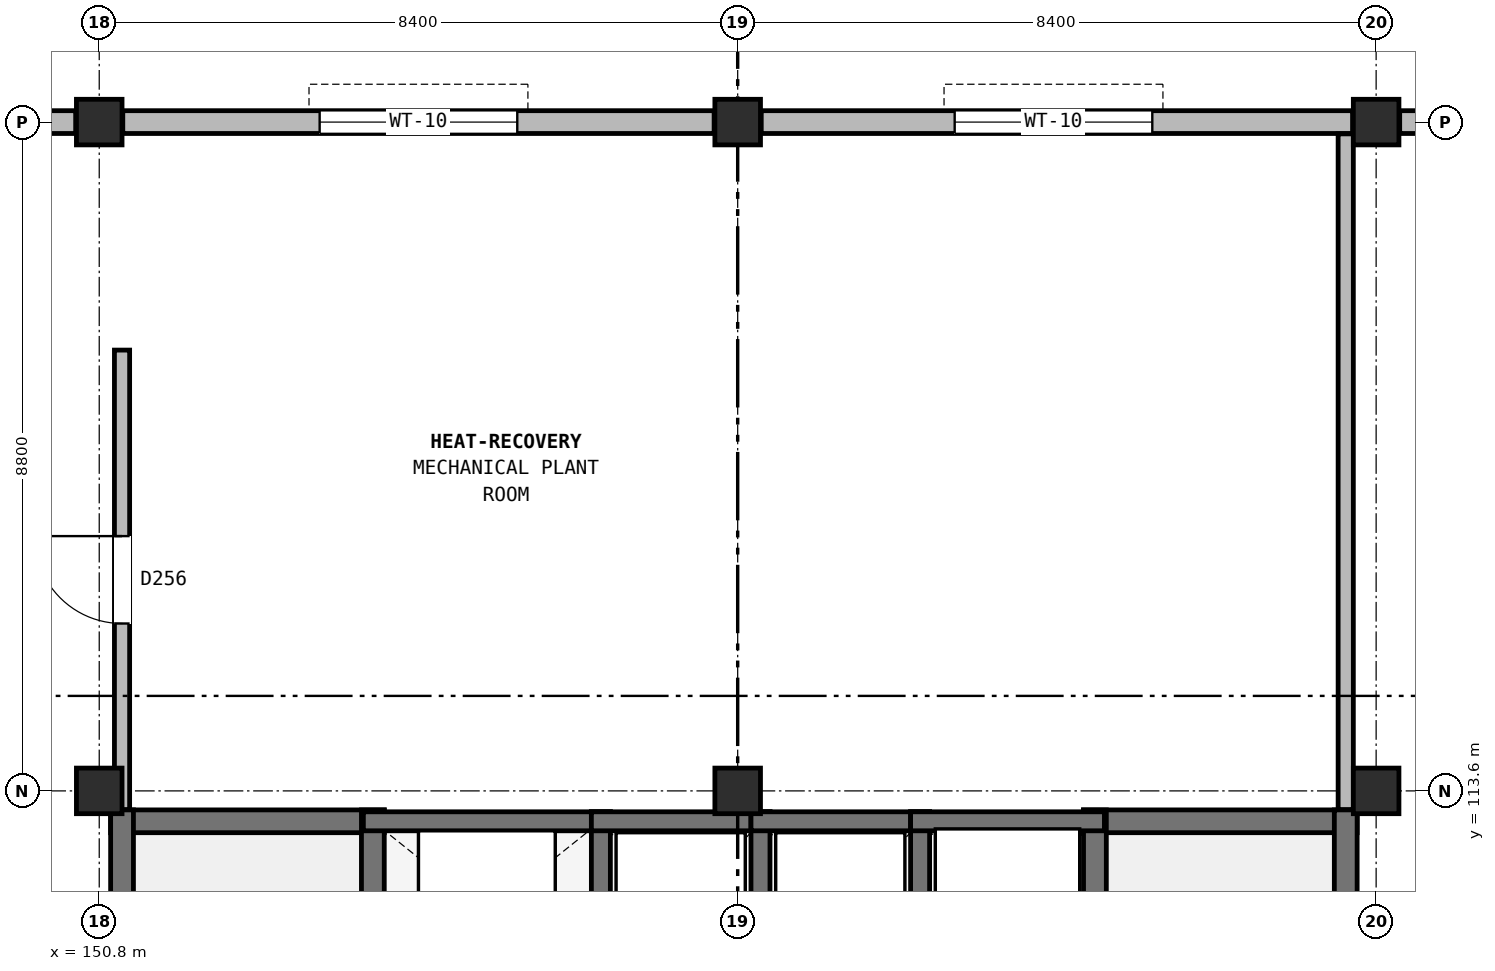
"""IFC4 building model, lengths in metres.
Left out: names, types, materials, properties, quantities, classifications, styles, units other than length and angle.
Written with IfcOpenShell. Run it as: python <this file> out.ifc"""

import sys

from ifc_helpers import new_model, si_unit, direction, frame, frame_2d, origin, origin_2d, place, context, subcontext, project, spatial, rectangle, extrude, element, fill, save


model = new_model("IFC4")
c1 = context("Model", 3, precision=1e-05, world=origin(), true_north=direction((0.0, 1.0)))
c2 = subcontext(c1, "Body", "Model", "MODEL_VIEW")
j1 = project(units=[si_unit("LENGTHUNIT", "METRE"), si_unit("PLANEANGLEUNIT", "RADIAN")], contexts=[c1])
p1 = place(None, origin())
s1 = spatial("IfcSite", under=j1, at=p1, CompositionType="ELEMENT")
p2 = place(p1, origin())
s2 = spatial("IfcBuilding", under=s1, at=p2, CompositionType="ELEMENT")
p3 = place(p2, frame((0.0, 0.0, 44.4)))
s3 = spatial("IfcBuildingStorey", under=s2, at=p3, CompositionType="ELEMENT", Elevation=44.4)
for number, where, z_axis, x_axis in (
    (1, (150.8, 113.6, 0.0), (0.0, 0.0, 1.0), (1.0, 0.0, 0.0)),
    (2, (150.8, 122.4, 0.0), (0.0, 0.0, 1.0), (1.0, 0.0, 0.0)),
    (3, (159.2, 113.6, 0.0), (0.0, 0.0, 1.0), (1.0, 0.0, 0.0)),
    (4, (159.2, 122.4, 0.0), (0.0, 0.0, 1.0), (1.0, 0.0, 0.0)),
    (5, (167.6, 113.6, 0.0), (0.0, 0.0, 1.0), (1.0, 0.0, 0.0)),
    (6, (167.6, 122.4, 0.0), (0.0, 0.0, 1.0), (1.0, 0.0, 0.0)),
):
    element("IfcColumn", number, at=place(p3, frame(where, z_axis=z_axis, x_axis=x_axis)), inside=s3, PredefinedType="COLUMN", context=c2, shape_type="SweptSolid", body=[
        extrude(rectangle(XDim=0.6, YDim=0.6, at=origin_2d()), origin(), (0.0, 0.0, 1.0), 3.8),
    ])
p4 = place(p3, frame((175.69, 122.4, 0.0), z_axis=(0.0, 0.0, 1.0), x_axis=(-1.0, 0.0, 0.0)))
e7 = element("IfcWall", 7, at=p4, inside=s3, PredefinedType="SOLIDWALL", context=c2, shape_type="SweptSolid", body=[
    extrude(rectangle(XDim=7.78, YDim=0.3, at=frame_2d((3.89, 0.0))), origin(), (0.0, 0.0, 1.0), 3.05),
])
p5 = place(p4, frame((0.745, 0.0, 0.9)))
e8 = element("IfcOpeningElement", 8, at=p5, cuts=e7, PredefinedType="OPENING", context=c2, shape_type="SweptSolid", body=[
    extrude(rectangle(XDim=2.6, YDim=2.0, at=frame_2d((1.3, 1.0))), frame((0.0, 0.16, 0.0), z_axis=(0.0, -1.0, 0.0), x_axis=(1.0, 0.0, 0.0)), (0.0, 0.0, 1.0), 0.32),
])
p6 = place(p3, frame((167.29, 122.4, 0.0), z_axis=(0.0, 0.0, 1.0), x_axis=(-1.0, 0.0, 0.0)))
e9 = element("IfcWall", 9, at=p6, inside=s3, PredefinedType="SOLIDWALL", context=c2, shape_type="SweptSolid", body=[
    extrude(rectangle(XDim=7.78, YDim=0.3, at=frame_2d((3.89, 0.0))), origin(), (0.0, 0.0, 1.0), 3.05),
])
p7 = place(p6, frame((2.635, 0.0, 0.9)))
e10 = element("IfcOpeningElement", 10, at=p7, cuts=e9, PredefinedType="OPENING", context=c2, shape_type="SweptSolid", body=[
    extrude(rectangle(XDim=2.6, YDim=2.0, at=frame_2d((1.3, 1.0))), frame((0.0, 0.16, 0.0), z_axis=(0.0, -1.0, 0.0), x_axis=(1.0, 0.0, 0.0)), (0.0, 0.0, 1.0), 0.32),
])
p8 = place(p3, frame((158.89, 122.4, 0.0), z_axis=(0.0, 0.0, 1.0), x_axis=(-1.0, 0.0, 0.0)))
e11 = element("IfcWall", 11, at=p8, inside=s3, PredefinedType="SOLIDWALL", context=c2, shape_type="SweptSolid", body=[
    extrude(rectangle(XDim=7.78, YDim=0.3, at=frame_2d((3.89, 0.0))), origin(), (0.0, 0.0, 1.0), 3.05),
])
p9 = place(p8, frame((2.59, 0.0, 0.9)))
e12 = element("IfcOpeningElement", 12, at=p9, cuts=e11, PredefinedType="OPENING", context=c2, shape_type="SweptSolid", body=[
    extrude(rectangle(XDim=2.6, YDim=2.0, at=frame_2d((1.3, 1.0))), frame((0.0, 0.16, 0.0), z_axis=(0.0, -1.0, 0.0), x_axis=(1.0, 0.0, 0.0)), (0.0, 0.0, 1.0), 0.32),
])
p10 = place(p3, frame((150.49, 122.4, 0.0), z_axis=(0.0, 0.0, 1.0), x_axis=(-1.0, 0.0, 0.0)))
e13 = element("IfcWall", 13, at=p10, inside=s3, PredefinedType="SOLIDWALL", context=c2, shape_type="SweptSolid", body=[
    extrude(rectangle(XDim=7.78, YDim=0.3, at=frame_2d((3.89, 0.0))), origin(), (0.0, 0.0, 1.0), 3.05),
])
p11 = place(p10, frame((3.31, 0.0, 0.9)))
e14 = element("IfcOpeningElement", 14, at=p11, cuts=e13, PredefinedType="OPENING", context=c2, shape_type="SweptSolid", body=[
    extrude(rectangle(XDim=1.16, YDim=1.74, at=frame_2d((0.58, 0.87))), frame((0.0, 0.16, 0.0), z_axis=(0.0, -1.0, 0.0), x_axis=(1.0, 0.0, 0.0)), (0.0, 0.0, 1.0), 0.32),
])
p12 = place(p3, frame((150.95, 113.2, 0.0), z_axis=(0.0, 0.0, 1.0), x_axis=(1.0, 0.0, 0.0)))
e15 = element("IfcWall", 15, at=p12, inside=s3, PredefinedType="SHEAR", context=c2, shape_type="SweptSolid", body=[
    extrude(rectangle(XDim=3.6, YDim=0.3, at=frame_2d((1.8, 0.0))), origin(), (0.0, 0.0, 1.0), 3.8),
])
p13 = place(p3, frame((151.1, 105.05, 0.0), z_axis=(0.0, 0.0, 1.0), x_axis=(0.0, 1.0, 0.0)))
e16 = element("IfcWall", 16, at=p13, inside=s3, PredefinedType="SHEAR", context=c2, shape_type="SweptSolid", body=[
    extrude(rectangle(XDim=8.3, YDim=0.3, at=frame_2d((4.15, 0.0))), origin(), (0.0, 0.0, 1.0), 3.8),
])
p14 = place(p3, frame((154.4, 105.05, 0.0), z_axis=(0.0, 0.0, 1.0), x_axis=(0.0, 1.0, 0.0)))
e17 = element("IfcWall", 17, at=p14, inside=s3, PredefinedType="SHEAR", context=c2, shape_type="SweptSolid", body=[
    extrude(rectangle(XDim=8.3, YDim=0.3, at=frame_2d((4.15, 0.0))), origin(), (0.0, 0.0, 1.0), 3.8),
])
p15 = place(p14, frame((0.45, 0.0, 0.0)))
e18 = element("IfcOpeningElement", 18, at=p15, cuts=e17, PredefinedType="OPENING", context=c2, shape_type="SweptSolid", body=[
    extrude(rectangle(XDim=1.1, YDim=2.2, at=frame_2d((0.55, 1.1))), frame((0.0, 0.16, 0.0), z_axis=(0.0, -1.0, 0.0), x_axis=(1.0, 0.0, 0.0)), (0.0, 0.0, 1.0), 0.32),
])
p16 = place(p3, frame((163.75, 113.2, 0.0), z_axis=(0.0, 0.0, 1.0), x_axis=(1.0, 0.0, 0.0)))
e19 = element("IfcWall", 19, at=p16, inside=s3, PredefinedType="SHEAR", context=c2, shape_type="SweptSolid", body=[
    extrude(rectangle(XDim=3.6, YDim=0.3, at=frame_2d((1.8, 0.0))), origin(), (0.0, 0.0, 1.0), 3.8),
])
for number, where, z_axis, x_axis in (
    (20, (163.9, 105.05, 0.0), (0.0, 0.0, 1.0), (0.0, 1.0, 0.0)),
    (21, (167.2, 105.05, 0.0), (0.0, 0.0, 1.0), (0.0, 1.0, 0.0)),
):
    element("IfcWall", number, at=place(p3, frame(where, z_axis=z_axis, x_axis=x_axis)), inside=s3, PredefinedType="SHEAR", context=c2, shape_type="SweptSolid", body=[
        extrude(rectangle(XDim=8.3, YDim=0.3, at=frame_2d((4.15, 0.0))), origin(), (0.0, 0.0, 1.0), 3.8),
    ])
p17 = place(p3, frame((154.275, 113.2, 0.0), z_axis=(0.0, 0.0, 1.0), x_axis=(1.0, 0.0, 0.0)))
e22 = element("IfcWall", 22, at=p17, inside=s3, PredefinedType="SOLIDWALL", context=c2, shape_type="SweptSolid", body=[
    extrude(rectangle(XDim=3.25, YDim=0.25, at=frame_2d((1.625, 0.0))), origin(), (0.0, 0.0, 1.0), 3.48),
])
p18 = place(p3, frame((157.4, 110.675, 0.0), z_axis=(0.0, 0.0, 1.0), x_axis=(0.0, 1.0, 0.0)))
e23 = element("IfcWall", 23, at=p18, inside=s3, PredefinedType="SOLIDWALL", context=c2, shape_type="SweptSolid", body=[
    extrude(rectangle(XDim=2.65, YDim=0.25, at=frame_2d((1.325, 0.0))), origin(), (0.0, 0.0, 1.0), 3.48),
])
p19 = place(p3, frame((157.275, 113.2, 0.0), z_axis=(0.0, 0.0, 1.0), x_axis=(1.0, 0.0, 0.0)))
e24 = element("IfcWall", 24, at=p19, inside=s3, PredefinedType="SOLIDWALL", context=c2, shape_type="SweptSolid", body=[
    extrude(rectangle(XDim=2.35, YDim=0.25, at=frame_2d((1.175, 0.0))), origin(), (0.0, 0.0, 1.0), 3.48),
])
p20 = place(p3, frame((159.5, 110.675, 0.0), z_axis=(0.0, 0.0, 1.0), x_axis=(0.0, 1.0, 0.0)))
e25 = element("IfcWall", 25, at=p20, inside=s3, PredefinedType="SOLIDWALL", context=c2, shape_type="SweptSolid", body=[
    extrude(rectangle(XDim=2.65, YDim=0.25, at=frame_2d((1.325, 0.0))), origin(), (0.0, 0.0, 1.0), 3.48),
])
p21 = place(p3, frame((159.375, 113.2, 0.0), z_axis=(0.0, 0.0, 1.0), x_axis=(1.0, 0.0, 0.0)))
e26 = element("IfcWall", 26, at=p21, inside=s3, PredefinedType="SOLIDWALL", context=c2, shape_type="SweptSolid", body=[
    extrude(rectangle(XDim=2.35, YDim=0.25, at=frame_2d((1.175, 0.0))), origin(), (0.0, 0.0, 1.0), 3.48),
])
p22 = place(p3, frame((161.6, 110.675, 0.0), z_axis=(0.0, 0.0, 1.0), x_axis=(0.0, 1.0, 0.0)))
e27 = element("IfcWall", 27, at=p22, inside=s3, PredefinedType="SOLIDWALL", context=c2, shape_type="SweptSolid", body=[
    extrude(rectangle(XDim=2.65, YDim=0.25, at=frame_2d((1.325, 0.0))), origin(), (0.0, 0.0, 1.0), 3.48),
])
p23 = place(p3, frame((161.475, 113.2, 0.0), z_axis=(0.0, 0.0, 1.0), x_axis=(1.0, 0.0, 0.0)))
e28 = element("IfcWall", 28, at=p23, inside=s3, PredefinedType="SOLIDWALL", context=c2, shape_type="SweptSolid", body=[
    extrude(rectangle(XDim=2.55, YDim=0.25, at=frame_2d((1.275, 0.0))), origin(), (0.0, 0.0, 1.0), 3.48),
])
p24 = place(p3, frame((151.1, 113.355, 0.0), z_axis=(0.0, 0.0, 1.0), x_axis=(0.0, 1.0, 0.0)))
e29 = element("IfcWall", 29, at=p24, inside=s3, PredefinedType="PARTITIONING", context=c2, shape_type="SweptSolid", body=[
    extrude(rectangle(XDim=6.045, YDim=0.2, at=frame_2d((3.022, 0.0))), origin(), (0.0, 0.0, 1.0), 3.045),
])
p25 = place(p24, frame((2.448, 0.0, 0.0)))
e30 = element("IfcOpeningElement", 30, at=p25, cuts=e29, PredefinedType="OPENING", context=c2, shape_type="SweptSolid", body=[
    extrude(rectangle(XDim=1.15, YDim=2.2, at=frame_2d((0.575, 1.1))), frame((0.0, 0.11, 0.0), z_axis=(0.0, -1.0, 0.0), x_axis=(1.0, 0.0, 0.0)), (0.0, 0.0, 1.0), 0.22),
])
p26 = place(p3, frame((167.2, 113.355, 0.0), z_axis=(0.0, 0.0, 1.0), x_axis=(0.0, 1.0, 0.0)))
e31 = element("IfcWall", 31, at=p26, inside=s3, PredefinedType="PARTITIONING", context=c2, shape_type="SweptSolid", body=[
    extrude(rectangle(XDim=8.89, YDim=0.2, at=frame_2d((4.445, 0.0))), origin(), (0.0, 0.0, 1.0), 3.045),
])
p27 = place(p7, origin())
e32 = element("IfcWindow", 32, at=p27, inside=s3, PartitioningType="SINGLE_PANEL", PredefinedType="WINDOW", context=c2, shape_type="SweptSolid", body=[
    extrude(rectangle(XDim=2.6, YDim=2.0, at=frame_2d((1.3, 1.0))), frame((0.0, 0.03, 0.0), z_axis=(0.0, -1.0, 0.0), x_axis=(1.0, 0.0, 0.0)), (0.0, 0.0, 1.0), 0.06),
])
fill(e10, e32)
p28 = place(p9, origin())
e33 = element("IfcWindow", 33, at=p28, inside=s3, PartitioningType="SINGLE_PANEL", PredefinedType="WINDOW", context=c2, shape_type="SweptSolid", body=[
    extrude(rectangle(XDim=2.6, YDim=2.0, at=frame_2d((1.3, 1.0))), frame((0.0, 0.03, 0.0), z_axis=(0.0, -1.0, 0.0), x_axis=(1.0, 0.0, 0.0)), (0.0, 0.0, 1.0), 0.06),
])
fill(e12, e33)
p29 = place(p25, origin())
e34 = element("IfcDoor", 34, at=p29, inside=s3, OperationType="SINGLE_SWING_RIGHT", PredefinedType="DOOR", context=c2, shape_type="SweptSolid", body=[
    extrude(rectangle(XDim=1.15, YDim=2.2, at=frame_2d((0.575, 1.1))), frame((0.0, 0.025, 0.0), z_axis=(0.0, -1.0, 0.0), x_axis=(1.0, 0.0, 0.0)), (0.0, 0.0, 1.0), 0.05),
])
fill(e30, e34)
save(model, sys.argv[1])
